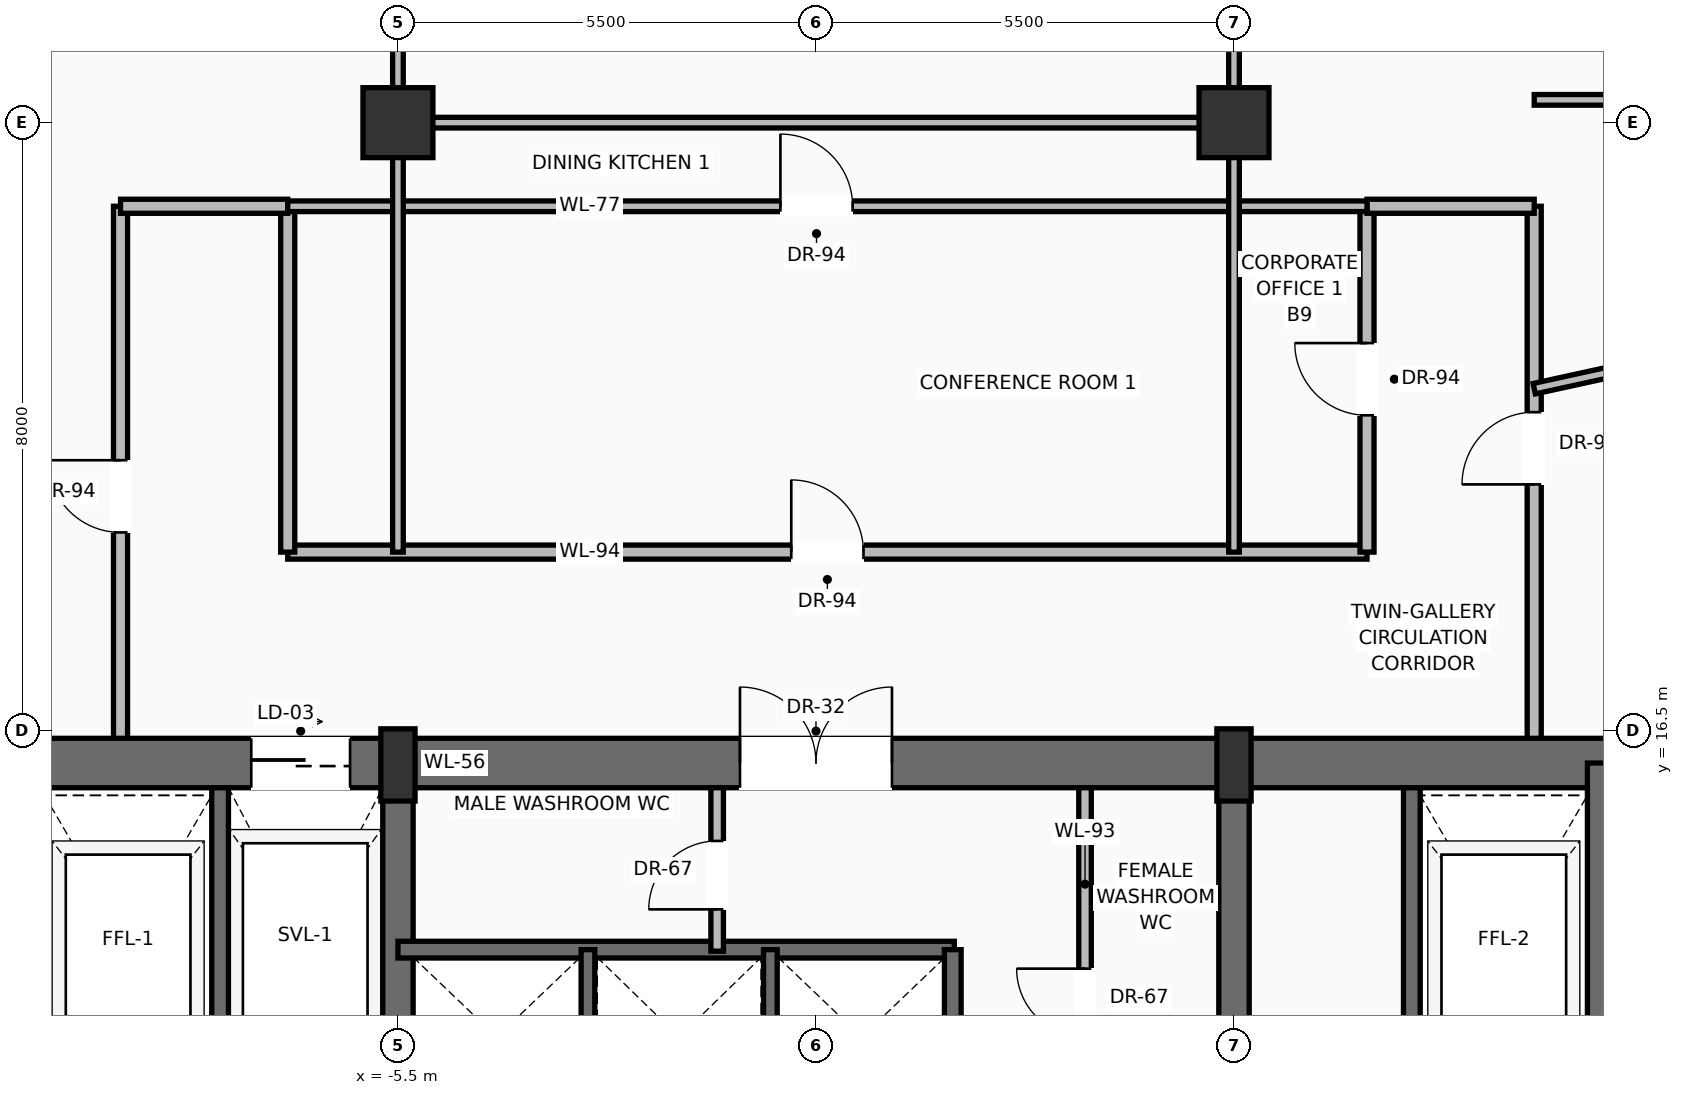
"""IFC4 building model, lengths in metres.
Left out: names, types, materials, properties, quantities, classifications, styles, units other than length and angle.
Written with IfcOpenShell. Run it as: python <this file> out.ifc"""

import sys

from ifc_helpers import new_model, si_unit, direction, frame, frame_2d, origin, origin_2d, place, context, subcontext, project, spatial, rectangle, extrude, source, transform, mapped, element, fill, save


model = new_model("IFC4")
c1 = context("Model", 3, precision=1e-05, world=origin(), true_north=direction((0.0, 1.0)))
c2 = subcontext(c1, "Body", "Model", "MODEL_VIEW")
j1 = project(units=[si_unit("LENGTHUNIT", "METRE"), si_unit("PLANEANGLEUNIT", "RADIAN")], contexts=[c1])
p1 = place(None, origin())
s1 = spatial("IfcSite", under=j1, at=p1, CompositionType="ELEMENT")
p2 = place(p1, origin())
s2 = spatial("IfcBuilding", under=s1, at=p2, CompositionType="ELEMENT")
p3 = place(p2, frame((0.0, 0.0, 193.2)))
s3 = spatial("IfcBuildingStorey", under=s2, at=p3, CompositionType="ELEMENT", Elevation=193.2)
p4 = place(p3, frame((-10.8, 16.075, 0.0), z_axis=(0.0, 0.0, 1.0), x_axis=(1.0, 0.0, 0.0)))
e1 = element("IfcWall", 1, at=p4, inside=s3, PredefinedType="SHEAR", context=c2, shape_type="SweptSolid", body=[
    extrude(rectangle(XDim=21.6, YDim=0.65, at=frame_2d((10.8, 0.0))), origin(), (0.0, 0.0, 1.0), 3.47),
])
p5 = place(p4, frame((3.37, 0.0, 0.0)))
e2 = element("IfcOpeningElement", 2, at=p5, cuts=e1, PredefinedType="OPENING", context=c2, shape_type="SweptSolid", body=[
    extrude(rectangle(XDim=1.3, YDim=2.3, at=frame_2d((0.65, 1.15))), frame((0.0, 0.335, 0.0), z_axis=(0.0, -1.0, 0.0), x_axis=(1.0, 0.0, 0.0)), (0.0, 0.0, 1.0), 0.67),
])
p6 = place(p4, frame((9.8, 0.0, 0.0)))
e3 = element("IfcOpeningElement", 3, at=p6, cuts=e1, PredefinedType="OPENING", context=c2, shape_type="SweptSolid", body=[
    extrude(rectangle(XDim=2.0, YDim=2.4, at=frame_2d((1.0, 1.2))), frame((0.0, 0.335, 0.0), z_axis=(0.0, -1.0, 0.0), x_axis=(1.0, 0.0, 0.0)), (0.0, 0.0, 1.0), 0.67),
])
p7 = place(p3, frame((10.475, 0.525, 0.0), z_axis=(0.0, 0.0, 1.0), x_axis=(0.0, 1.0, 0.0)))
e4 = element("IfcWall", 4, at=p7, inside=s3, PredefinedType="SHEAR", context=c2, shape_type="SweptSolid", body=[
    extrude(rectangle(XDim=15.55, YDim=0.65, at=frame_2d((7.775, 0.0))), origin(), (0.0, 0.0, 1.0), 3.47),
])
p8 = place(p3, frame((-5.5, 0.525, 0.0), z_axis=(0.0, 0.0, 1.0), x_axis=(0.0, 1.0, 0.0)))
e5 = element("IfcWall", 5, at=p8, inside=s3, PredefinedType="SHEAR", context=c2, shape_type="SweptSolid", body=[
    extrude(rectangle(XDim=15.55, YDim=0.4, at=frame_2d((7.775, 0.0))), origin(), (0.0, 0.0, 1.0), 3.47),
])
p9 = place(p8, frame((8.975, 0.0, 0.0)))
e6 = element("IfcOpeningElement", 6, at=p9, cuts=e5, PredefinedType="OPENING", context=c2, shape_type="SweptSolid", body=[
    extrude(rectangle(XDim=1.1, YDim=2.2, at=frame_2d((0.55, 1.1))), frame((0.0, 0.21, 0.0), z_axis=(0.0, -1.0, 0.0), x_axis=(1.0, 0.0, 0.0)), (0.0, 0.0, 1.0), 0.42),
])
p10 = place(p3, frame((5.5, 0.525, 0.0), z_axis=(0.0, 0.0, 1.0), x_axis=(0.0, 1.0, 0.0)))
e7 = element("IfcWall", 7, at=p10, inside=s3, PredefinedType="SHEAR", context=c2, shape_type="SweptSolid", body=[
    extrude(rectangle(XDim=15.55, YDim=0.4, at=frame_2d((7.775, 0.0))), origin(), (0.0, 0.0, 1.0), 3.47),
])
p11 = place(p10, frame((8.975, 0.0, 0.0)))
e8 = element("IfcOpeningElement", 8, at=p11, cuts=e7, PredefinedType="OPENING", context=c2, shape_type="SweptSolid", body=[
    extrude(rectangle(XDim=1.1, YDim=2.2, at=frame_2d((0.55, 1.1))), frame((0.0, 0.21, 0.0), z_axis=(0.0, -1.0, 0.0), x_axis=(1.0, 0.0, 0.0)), (0.0, 0.0, 1.0), 0.42),
])
m1 = source(origin(), c2, "Body", "SweptSolid", [
    extrude(rectangle(XDim=0.45, YDim=0.95, at=origin_2d()), origin(), (0.0, 0.0, 1.0), 3.7),
])
for number, where, z_axis, x_axis in (
    (9, (-5.5, 16.05, 0.0), (0.0, 0.0, 1.0), (1.0, 0.0, 0.0)),
    (10, (5.5, 16.05, 0.0), (0.0, 0.0, 1.0), (1.0, 0.0, 0.0)),
):
    element("IfcColumn", number, at=place(p3, frame(where, z_axis=z_axis, x_axis=x_axis)), inside=s3, PredefinedType="PILASTER", context=c2, shape_type="MappedRepresentation", body=[
        mapped(m1, transform((0.0, 0.0, 0.0), scale=1.0)),
    ])
m2 = source(origin(), c2, "Body", "SweptSolid", [
    extrude(rectangle(XDim=0.92, YDim=0.92, at=origin_2d()), origin(), (0.0, 0.0, 1.0), 3.7),
])
for number, where, z_axis, x_axis in (
    (11, (-5.5, 24.5, 0.0), (0.0, 0.0, 1.0), (1.0, 0.0, 0.0)),
    (12, (5.5, 24.5, 0.0), (0.0, 0.0, 1.0), (1.0, 0.0, 0.0)),
):
    element("IfcColumn", number, at=place(p3, frame(where, z_axis=z_axis, x_axis=x_axis)), inside=s3, PredefinedType="COLUMN", context=c2, shape_type="MappedRepresentation", body=[
        mapped(m2, transform((0.0, 0.0, 0.0), scale=1.0)),
    ])
p12 = place(p3, frame((9.726, 32.379, 0.0), z_axis=(0.0, 0.0, 1.0), x_axis=(0.534579680482, -0.845118077676, 0.0)))
e13 = element("IfcWall", 13, at=p12, inside=s3, PredefinedType="SOLIDWALL", context=c2, shape_type="SweptSolid", body=[
    extrude(rectangle(XDim=18.987, YDim=0.28, at=frame_2d((9.494, 0.0))), origin(), (0.0, 0.0, 1.0), 3.05),
])
p13 = place(p12, frame((4.557, 0.0, 0.0)))
e14 = element("IfcOpeningElement", 14, at=p13, cuts=e13, PredefinedType="OPENING", context=c2, shape_type="SweptSolid", body=[
    extrude(rectangle(XDim=1.6, YDim=2.35, at=frame_2d((0.8, 1.175))), frame((0.0, 0.15, 0.0), z_axis=(0.0, -1.0, 0.0), x_axis=(1.0, 0.0, 0.0)), (0.0, 0.0, 1.0), 0.3),
])
p14 = place(p12, frame((12.911, 0.0, 0.9)))
e15 = element("IfcOpeningElement", 15, at=p14, cuts=e13, PredefinedType="OPENING", context=c2, shape_type="SweptSolid", body=[
    extrude(rectangle(XDim=1.55, YDim=1.85, at=frame_2d((0.775, 0.925))), frame((0.0, 0.15, 0.0), z_axis=(0.0, -1.0, 0.0), x_axis=(1.0, 0.0, 0.0)), (0.0, 0.0, 1.0), 0.3),
])
for number, where, z_axis, x_axis in (
    (16, (-7.84, 11.87, 0.0), (0.0, 0.0, 1.0), (0.0, 1.0, 0.0)),
    (17, (7.84, 11.87, 0.0), (0.0, 0.0, 1.0), (0.0, 1.0, 0.0)),
):
    element("IfcWall", number, at=place(p3, frame(where, z_axis=z_axis, x_axis=x_axis)), inside=s3, PredefinedType="SOLIDWALL", context=c2, shape_type="SweptSolid", body=[
        extrude(rectangle(XDim=3.88, YDim=0.22, at=frame_2d((1.94, 0.0))), origin(), (0.0, 0.0, 1.0), 3.47),
    ])
p15 = place(p3, frame((-5.5, 13.62, 0.0), z_axis=(0.0, 0.0, 1.0), x_axis=(1.0, 0.0, 0.0)))
e18 = element("IfcWall", 18, at=p15, inside=s3, PredefinedType="SOLIDWALL", context=c2, shape_type="SweptSolid", body=[
    extrude(rectangle(XDim=7.32, YDim=0.22, at=frame_2d((3.66, 0.0))), origin(), (0.0, 0.0, 1.0), 3.47),
])
p16 = place(p3, frame((1.8, 11.32, 0.0), z_axis=(0.0, 0.0, 1.0), x_axis=(0.0, 1.0, 0.0)))
e19 = element("IfcWall", 19, at=p16, inside=s3, PredefinedType="SOLIDWALL", context=c2, shape_type="SweptSolid", body=[
    extrude(rectangle(XDim=2.3, YDim=0.22, at=frame_2d((1.15, 0.0))), origin(), (0.0, 0.0, 1.0), 3.47),
])
for number, where, z_axis, x_axis in (
    (20, (-3.0, 11.32, 0.0), (0.0, 0.0, 1.0), (0.0, 1.0, 0.0)),
    (21, (-0.6, 11.32, 0.0), (0.0, 0.0, 1.0), (0.0, 1.0, 0.0)),
):
    element("IfcWall", number, at=place(p3, frame(where, z_axis=z_axis, x_axis=x_axis)), inside=s3, PredefinedType="SOLIDWALL", context=c2, shape_type="SweptSolid", body=[
        extrude(rectangle(XDim=2.3, YDim=0.18, at=frame_2d((1.15, 0.0))), origin(), (0.0, 0.0, 1.0), 3.47),
    ])
p17 = place(p3, frame((-1.3, 13.6, 0.0), z_axis=(0.0, 0.0, 1.0), x_axis=(0.0, 1.0, 0.0)))
e22 = element("IfcWall", 22, at=p17, inside=s3, PredefinedType="PARTITIONING", context=c2, shape_type="SweptSolid", body=[
    extrude(rectangle(XDim=2.15, YDim=0.165, at=frame_2d((1.075, 0.0))), origin(), (0.0, 0.0, 1.0), 3.462),
])
p18 = place(p17, frame((0.55, 0.0, 0.0)))
e23 = element("IfcOpeningElement", 23, at=p18, cuts=e22, PredefinedType="OPENING", context=c2, shape_type="SweptSolid", body=[
    extrude(rectangle(XDim=0.9, YDim=2.1, at=frame_2d((0.45, 1.05))), frame((0.0, 0.093, 0.0), z_axis=(0.0, -1.0, 0.0), x_axis=(1.0, 0.0, 0.0)), (0.0, 0.0, 1.0), 0.185),
])
p19 = place(p3, frame((3.54, 11.22, 0.0), z_axis=(0.0, 0.0, 1.0), x_axis=(0.0, 1.0, 0.0)))
e24 = element("IfcWall", 24, at=p19, inside=s3, PredefinedType="PARTITIONING", context=c2, shape_type="SweptSolid", body=[
    extrude(rectangle(XDim=4.53, YDim=0.165, at=frame_2d((2.265, 0.0))), origin(), (0.0, 0.0, 1.0), 3.462),
])
p20 = place(p19, frame((1.25, 0.0, 0.0)))
e25 = element("IfcOpeningElement", 25, at=p20, cuts=e24, PredefinedType="OPENING", context=c2, shape_type="SweptSolid", body=[
    extrude(rectangle(XDim=0.9, YDim=2.1, at=frame_2d((0.45, 1.05))), frame((0.0, 0.093, 0.0), z_axis=(0.0, -1.0, 0.0), x_axis=(1.0, 0.0, 0.0)), (0.0, 0.0, 1.0), 0.185),
])
p21 = place(p3, frame((-6.95, 18.85, 0.0), z_axis=(0.0, 0.0, 1.0), x_axis=(1.0, 0.0, 0.0)))
e26 = element("IfcWall", 26, at=p21, inside=s3, PredefinedType="PARTITIONING", context=c2, shape_type="SweptSolid", body=[
    extrude(rectangle(XDim=14.2, YDim=0.185, at=frame_2d((7.1, 0.0))), origin(), (0.0, 0.0, 1.0), 2.846),
])
p22 = place(p21, frame((6.625, 0.0, 0.0)))
e27 = element("IfcOpeningElement", 27, at=p22, cuts=e26, PredefinedType="OPENING", context=c2, shape_type="SweptSolid", body=[
    extrude(rectangle(XDim=0.95, YDim=2.2, at=frame_2d((0.475, 1.1))), frame((0.0, 0.103, 0.0), z_axis=(0.0, -1.0, 0.0), x_axis=(1.0, 0.0, 0.0)), (0.0, 0.0, 1.0), 0.205),
])
p23 = place(p3, frame((-6.95, 18.85, 0.0), z_axis=(0.0, 0.0, 1.0), x_axis=(0.0, 1.0, 0.0)))
e28 = element("IfcWall", 28, at=p23, inside=s3, PredefinedType="PARTITIONING", context=c2, shape_type="SweptSolid", body=[
    extrude(rectangle(XDim=4.55, YDim=0.185, at=frame_2d((2.275, 0.0))), origin(), (0.0, 0.0, 1.0), 3.462),
])
p24 = place(p3, frame((7.25, 18.85, 0.0), z_axis=(0.0, 0.0, 1.0), x_axis=(0.0, 1.0, 0.0)))
e29 = element("IfcWall", 29, at=p24, inside=s3, PredefinedType="PARTITIONING", context=c2, shape_type="SweptSolid", body=[
    extrude(rectangle(XDim=4.55, YDim=0.185, at=frame_2d((2.275, 0.0))), origin(), (0.0, 0.0, 1.0), 3.462),
])
p25 = place(p24, frame((1.8, 0.0, 0.0)))
e30 = element("IfcOpeningElement", 30, at=p25, cuts=e29, PredefinedType="OPENING", context=c2, shape_type="SweptSolid", body=[
    extrude(rectangle(XDim=0.95, YDim=2.2, at=frame_2d((0.475, 1.1))), frame((0.0, 0.103, 0.0), z_axis=(0.0, -1.0, 0.0), x_axis=(1.0, 0.0, 0.0)), (0.0, 0.0, 1.0), 0.205),
])
p26 = place(p3, frame((-9.15, 16.4, 0.0), z_axis=(0.0, 0.0, 1.0), x_axis=(0.0, 1.0, 0.0)))
e31 = element("IfcWall", 31, at=p26, inside=s3, PredefinedType="PARTITIONING", context=c2, shape_type="SweptSolid", body=[
    extrude(rectangle(XDim=7.0, YDim=0.185, at=frame_2d((3.5, 0.0))), origin(), (0.0, 0.0, 1.0), 3.462),
])
p27 = place(p26, frame((2.709, 0.0, 0.0)))
e32 = element("IfcOpeningElement", 32, at=p27, cuts=e31, PredefinedType="OPENING", context=c2, shape_type="SweptSolid", body=[
    extrude(rectangle(XDim=0.95, YDim=2.2, at=frame_2d((0.475, 1.1))), frame((0.0, 0.103, 0.0), z_axis=(0.0, -1.0, 0.0), x_axis=(1.0, 0.0, 0.0)), (0.0, 0.0, 1.0), 0.205),
])
p28 = place(p3, frame((9.45, 16.4, 0.0), z_axis=(0.0, 0.0, 1.0), x_axis=(0.0, 1.0, 0.0)))
e33 = element("IfcWall", 33, at=p28, inside=s3, PredefinedType="PARTITIONING", context=c2, shape_type="SweptSolid", body=[
    extrude(rectangle(XDim=7.0, YDim=0.185, at=frame_2d((3.5, 0.0))), origin(), (0.0, 0.0, 1.0), 3.462),
])
p29 = place(p28, frame((3.341, 0.0, 0.0)))
e34 = element("IfcOpeningElement", 34, at=p29, cuts=e33, PredefinedType="OPENING", context=c2, shape_type="SweptSolid", body=[
    extrude(rectangle(XDim=0.95, YDim=2.2, at=frame_2d((0.475, 1.1))), frame((0.0, 0.103, 0.0), z_axis=(0.0, -1.0, 0.0), x_axis=(1.0, 0.0, 0.0)), (0.0, 0.0, 1.0), 0.205),
])
for number, where, z_axis, x_axis in (
    (35, (-9.15, 23.4, 0.0), (0.0, 0.0, 1.0), (1.0, 0.0, 0.0)),
    (36, (7.25, 23.4, 0.0), (0.0, 0.0, 1.0), (1.0, 0.0, 0.0)),
):
    element("IfcWall", number, at=place(p3, frame(where, z_axis=z_axis, x_axis=x_axis)), inside=s3, PredefinedType="PARTITIONING", context=c2, shape_type="SweptSolid", body=[
        extrude(rectangle(XDim=2.2, YDim=0.185, at=frame_2d((1.1, 0.0))), origin(), (0.0, 0.0, 1.0), 3.462),
    ])
p30 = place(p3, frame((-6.95, 23.4, 0.0), z_axis=(0.0, 0.0, 1.0), x_axis=(1.0, 0.0, 0.0)))
e37 = element("IfcWall", 37, at=p30, inside=s3, PredefinedType="PARTITIONING", context=c2, shape_type="SweptSolid", body=[
    extrude(rectangle(XDim=14.2, YDim=0.14, at=frame_2d((7.1, 0.0))), origin(), (0.0, 0.0, 1.0), 3.462),
])
p31 = place(p30, frame((6.482, 0.0, 0.0)))
e38 = element("IfcOpeningElement", 38, at=p31, cuts=e37, PredefinedType="OPENING", context=c2, shape_type="SweptSolid", body=[
    extrude(rectangle(XDim=0.95, YDim=2.2, at=frame_2d((0.475, 1.1))), frame((0.0, 0.08, 0.0), z_axis=(0.0, -1.0, 0.0), x_axis=(1.0, 0.0, 0.0)), (0.0, 0.0, 1.0), 0.16),
])
for number, where, z_axis, x_axis in (
    (39, (-5.5, 18.85, 0.0), (0.0, 0.0, 1.0), (0.0, 1.0, 0.0)),
    (40, (5.5, 18.85, 0.0), (0.0, 0.0, 1.0), (0.0, 1.0, 0.0)),
):
    element("IfcWall", number, at=place(p3, frame(where, z_axis=z_axis, x_axis=x_axis)), inside=s3, PredefinedType="PARTITIONING", context=c2, shape_type="SweptSolid", body=[
        extrude(rectangle(XDim=13.65, YDim=0.14, at=frame_2d((6.825, 0.0))), origin(), (0.0, 0.0, 1.0), 2.846),
    ])
p32 = place(p3, frame((-5.5, 24.5, 0.0), z_axis=(0.0, 0.0, 1.0), x_axis=(1.0, 0.0, 0.0)))
e41 = element("IfcWall", 41, at=p32, inside=s3, PredefinedType="PARTITIONING", context=c2, shape_type="SweptSolid", body=[
    extrude(rectangle(XDim=11.0, YDim=0.14, at=frame_2d((5.5, 0.0))), origin(), (0.0, 0.0, 1.0), 2.846),
])
p33 = place(p3, frame((9.45, 21.0, 0.0), z_axis=(0.0, 0.0, 1.0), x_axis=(0.976862381204, 0.213868857455, 0.0)))
e42 = element("IfcWall", 42, at=p33, inside=s3, PredefinedType="PARTITIONING", context=c2, shape_type="SweptSolid", body=[
    extrude(rectangle(XDim=6.858, YDim=0.14, at=frame_2d((3.429, 0.0))), origin(), (0.0, 0.0, 1.0), 3.049),
])
p34 = place(p3, frame((9.45, 24.8, 0.0), z_axis=(0.0, 0.0, 1.0), x_axis=(1.0, 0.0, 0.0)))
e43 = element("IfcWall", 43, at=p34, inside=s3, PredefinedType="PARTITIONING", context=c2, shape_type="SweptSolid", body=[
    extrude(rectangle(XDim=5.224, YDim=0.14, at=frame_2d((2.612, 0.0))), origin(), (0.0, 0.0, 1.0), 3.462),
])
m3 = source(origin(), c2, "Body", "SweptSolid", [
    extrude(rectangle(XDim=1.3, YDim=2.3, at=frame_2d((0.65, 1.15))), frame((0.0, 0.025, 0.0), z_axis=(0.0, -1.0, 0.0), x_axis=(1.0, 0.0, 0.0)), (0.0, 0.0, 1.0), 0.05),
])
p35 = place(p5, origin())
e44 = element("IfcDoor", 44, at=p35, inside=s3, OperationType="SLIDING_TO_RIGHT", PredefinedType="DOOR", context=c2, shape_type="MappedRepresentation", body=[
    mapped(m3, transform((0.0, 0.0, 0.0), scale=1.0)),
])
fill(e2, e44)
m4 = source(origin(), c2, "Body", "SweptSolid", [
    extrude(rectangle(XDim=2.0, YDim=2.4, at=frame_2d((1.0, 1.2))), frame((0.0, 0.025, 0.0), z_axis=(0.0, -1.0, 0.0), x_axis=(1.0, 0.0, 0.0)), (0.0, 0.0, 1.0), 0.05),
])
p36 = place(p6, origin())
e45 = element("IfcDoor", 45, at=p36, inside=s3, OperationType="DOUBLE_DOOR_SINGLE_SWING", PredefinedType="DOOR", context=c2, shape_type="MappedRepresentation", body=[
    mapped(m4, transform((0.0, 0.0, 0.0), scale=1.0)),
])
fill(e3, e45)
m5 = source(origin(), c2, "Body", "SweptSolid", [
    extrude(rectangle(XDim=0.9, YDim=2.1, at=frame_2d((0.45, 1.05))), frame((0.0, 0.025, 0.0), z_axis=(0.0, -1.0, 0.0), x_axis=(1.0, 0.0, 0.0)), (0.0, 0.0, 1.0), 0.05),
])
p37 = place(p18, origin())
e46 = element("IfcDoor", 46, at=p37, inside=s3, OperationType="SINGLE_SWING_LEFT", PredefinedType="DOOR", context=c2, shape_type="MappedRepresentation", body=[
    mapped(m5, transform((0.0, 0.0, 0.0), scale=1.0)),
])
fill(e23, e46)
p38 = place(p20, origin())
e47 = element("IfcDoor", 47, at=p38, inside=s3, OperationType="SINGLE_SWING_RIGHT", PredefinedType="DOOR", context=c2, shape_type="MappedRepresentation", body=[
    mapped(m5, transform((0.0, 0.0, 0.0), scale=1.0)),
])
fill(e25, e47)
m6 = source(origin(), c2, "Body", "SweptSolid", [
    extrude(rectangle(XDim=0.95, YDim=2.2, at=frame_2d((0.475, 1.1))), frame((0.0, 0.025, 0.0), z_axis=(0.0, -1.0, 0.0), x_axis=(1.0, 0.0, 0.0)), (0.0, 0.0, 1.0), 0.05),
])
p39 = place(p22, origin())
e48 = element("IfcDoor", 48, at=p39, inside=s3, OperationType="SINGLE_SWING_LEFT", PredefinedType="DOOR", context=c2, shape_type="MappedRepresentation", body=[
    mapped(m6, transform((0.0, 0.0, 0.0), scale=1.0)),
])
fill(e27, e48)
p40 = place(p27, origin())
e49 = element("IfcDoor", 49, at=p40, inside=s3, OperationType="SINGLE_SWING_RIGHT", PredefinedType="DOOR", context=c2, shape_type="MappedRepresentation", body=[
    mapped(m6, transform((0.0, 0.0, 0.0), scale=1.0)),
])
fill(e32, e49)
p41 = place(p29, origin())
e50 = element("IfcDoor", 50, at=p41, inside=s3, OperationType="SINGLE_SWING_LEFT", PredefinedType="DOOR", context=c2, shape_type="MappedRepresentation", body=[
    mapped(m6, transform((0.0, 0.0, 0.0), scale=1.0)),
])
fill(e34, e50)
p42 = place(p25, origin())
e51 = element("IfcDoor", 51, at=p42, inside=s3, OperationType="SINGLE_SWING_RIGHT", PredefinedType="DOOR", context=c2, shape_type="MappedRepresentation", body=[
    mapped(m6, transform((0.0, 0.0, 0.0), scale=1.0)),
])
fill(e30, e51)
p43 = place(p31, origin())
e52 = element("IfcDoor", 52, at=p43, inside=s3, OperationType="SINGLE_SWING_LEFT", PredefinedType="DOOR", context=c2, shape_type="MappedRepresentation", body=[
    mapped(m6, transform((0.0, 0.0, 0.0), scale=1.0)),
])
fill(e38, e52)
save(model, sys.argv[1])
